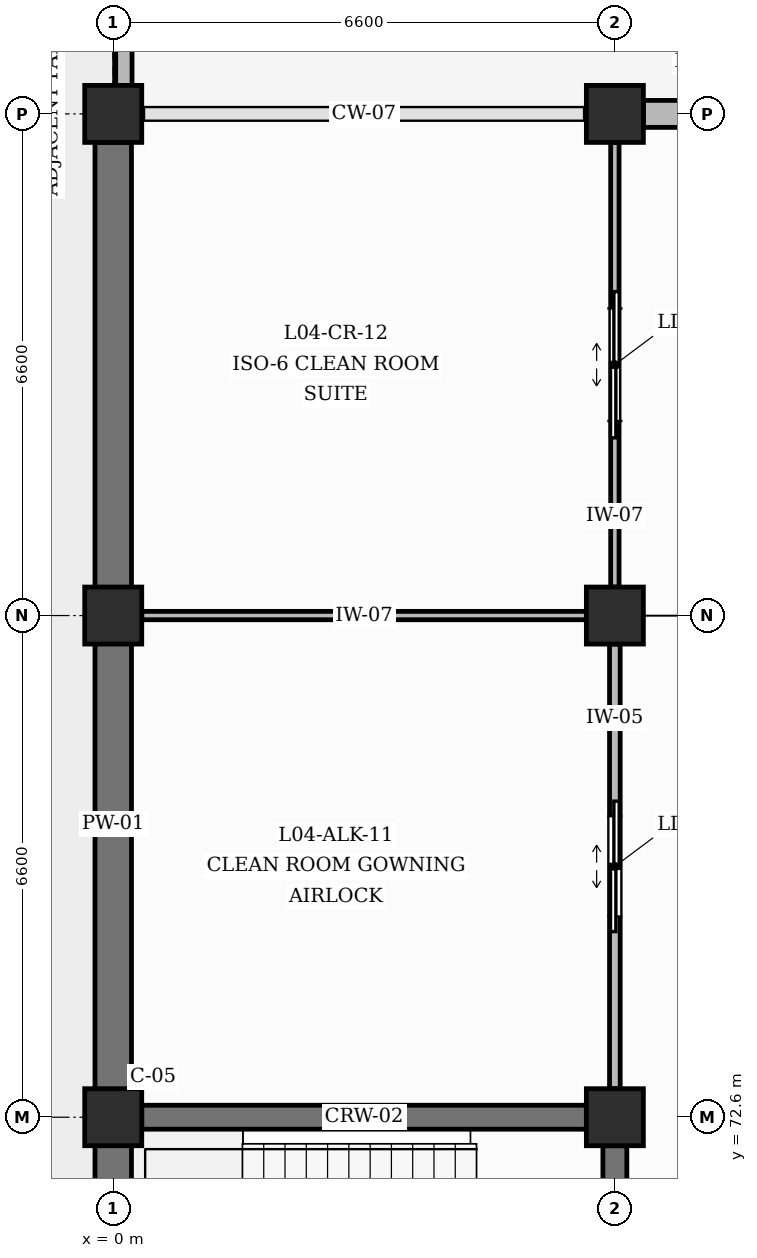
"""IFC4 building model, lengths in metres.
Left out: names, types, materials, properties, quantities, classifications, styles, units other than length and angle.
Written with IfcOpenShell. Run it as: python <this file> out.ifc"""

import sys

from ifc_helpers import new_model, si_unit, direction, frame, frame_2d, origin, origin_2d, place, context, subcontext, project, spatial, rectangle, extrude, element, fill, save


model = new_model("IFC4")
c1 = context("Model", 3, precision=1e-05, world=origin(), true_north=direction((0.0, 1.0)))
c2 = subcontext(c1, "Body", "Model", "MODEL_VIEW")
j1 = project(units=[si_unit("LENGTHUNIT", "METRE"), si_unit("PLANEANGLEUNIT", "RADIAN")], contexts=[c1])
p1 = place(None, origin())
s1 = spatial("IfcSite", under=j1, at=p1, CompositionType="ELEMENT")
p2 = place(p1, origin())
s2 = spatial("IfcBuilding", under=s1, at=p2, CompositionType="ELEMENT")
p3 = place(p2, frame((0.0, 0.0, 18.6)))
s3 = spatial("IfcBuildingStorey", under=s2, at=p3, CompositionType="ELEMENT", Elevation=18.6)
for number, where, z_axis, x_axis in (
    (1, (0.0, 72.6, 0.0), (0.0, 0.0, 1.0), (1.0, 0.0, 0.0)),
    (2, (0.0, 79.2, 0.0), (0.0, 0.0, 1.0), (1.0, 0.0, 0.0)),
    (3, (0.0, 85.8, 0.0), (0.0, 0.0, 1.0), (1.0, 0.0, 0.0)),
    (4, (6.6, 72.6, 0.0), (0.0, 0.0, 1.0), (1.0, 0.0, 0.0)),
    (5, (6.6, 79.2, 0.0), (0.0, 0.0, 1.0), (1.0, 0.0, 0.0)),
    (6, (6.6, 85.8, 0.0), (0.0, 0.0, 1.0), (1.0, 0.0, 0.0)),
):
    element("IfcColumn", number, at=place(p3, frame(where, z_axis=z_axis, x_axis=x_axis)), inside=s3, PredefinedType="COLUMN", context=c2, shape_type="SweptSolid", body=[
        extrude(rectangle(XDim=0.75, YDim=0.75, at=origin_2d()), origin(), (0.0, 0.0, 1.0), 4.2),
    ])
p4 = place(p3, frame((0.0, 66.375, 0.0), z_axis=(0.0, 0.0, 1.0), x_axis=(0.0, 1.0, 0.0)))
e7 = element("IfcWall", 7, at=p4, inside=s3, PredefinedType="SOLIDWALL", context=c2, shape_type="SweptSolid", body=[
    extrude(rectangle(XDim=5.85, YDim=0.48, at=frame_2d((2.925, 0.0))), origin(), (0.0, 0.0, 1.0), 3.26),
])
p5 = place(p3, frame((0.0, 72.975, 0.0), z_axis=(0.0, 0.0, 1.0), x_axis=(0.0, 1.0, 0.0)))
e8 = element("IfcWall", 8, at=p5, inside=s3, PredefinedType="SOLIDWALL", context=c2, shape_type="SweptSolid", body=[
    extrude(rectangle(XDim=5.85, YDim=0.48, at=frame_2d((2.925, 0.0))), origin(), (0.0, 0.0, 1.0), 3.26),
])
p6 = place(p3, frame((0.0, 79.575, 0.0), z_axis=(0.0, 0.0, 1.0), x_axis=(0.0, 1.0, 0.0)))
e9 = element("IfcWall", 9, at=p6, inside=s3, PredefinedType="SOLIDWALL", context=c2, shape_type="SweptSolid", body=[
    extrude(rectangle(XDim=5.85, YDim=0.48, at=frame_2d((2.925, 0.0))), origin(), (0.0, 0.0, 1.0), 3.26),
])
p7 = place(p3, frame((6.975, 85.8, 0.0), z_axis=(0.0, 0.0, 1.0), x_axis=(1.0, 0.0, 0.0)))
e10 = element("IfcWall", 10, at=p7, inside=s3, PredefinedType="SOLIDWALL", context=c2, shape_type="SweptSolid", body=[
    extrude(rectangle(XDim=5.85, YDim=0.355, at=frame_2d((2.925, 0.0))), origin(), (0.0, 0.0, 1.0), 3.26),
])
p8 = place(p7, frame((0.8, 0.0, 0.95)))
e11 = element("IfcOpeningElement", 11, at=p8, cuts=e10, PredefinedType="OPENING", context=c2, shape_type="SweptSolid", body=[
    extrude(rectangle(XDim=1.02, YDim=1.3, at=frame_2d((0.51, 0.65))), frame((0.0, 0.188, 0.0), z_axis=(0.0, -1.0, 0.0), x_axis=(1.0, 0.0, 0.0)), (0.0, 0.0, 1.0), 0.375),
])
p9 = place(p7, frame((4.03, 0.0, 0.95)))
e12 = element("IfcOpeningElement", 12, at=p9, cuts=e10, PredefinedType="OPENING", context=c2, shape_type="SweptSolid", body=[
    extrude(rectangle(XDim=1.02, YDim=1.3, at=frame_2d((0.51, 0.65))), frame((0.0, 0.188, 0.0), z_axis=(0.0, -1.0, 0.0), x_axis=(1.0, 0.0, 0.0)), (0.0, 0.0, 1.0), 0.375),
])
p10 = place(p3, frame((0.14, 86.1, 0.0), z_axis=(0.0, 0.0, 1.0), x_axis=(0.0, 1.0, 0.0)))
e13 = element("IfcWall", 13, at=p10, inside=s3, PredefinedType="PARAPET", context=c2, shape_type="SweptSolid", body=[
    extrude(rectangle(XDim=6.0, YDim=0.215, at=frame_2d((3.0, 0.0))), origin(), (0.0, 0.0, 1.0), 1.15),
])
p11 = place(p3, frame((0.375, 72.6, 0.0), z_axis=(0.0, 0.0, 1.0), x_axis=(1.0, 0.0, 0.0)))
e14 = element("IfcWall", 14, at=p11, inside=s3, PredefinedType="SHEAR", context=c2, shape_type="SweptSolid", body=[
    extrude(rectangle(XDim=5.85, YDim=0.315, at=frame_2d((2.925, 0.0))), origin(), (0.0, 0.0, 1.0), 3.16),
])
p12 = place(p3, frame((6.6, 66.375, 0.0), z_axis=(0.0, 0.0, 1.0), x_axis=(0.0, 1.0, 0.0)))
e15 = element("IfcWall", 15, at=p12, inside=s3, PredefinedType="SHEAR", context=c2, shape_type="SweptSolid", body=[
    extrude(rectangle(XDim=5.85, YDim=0.315, at=frame_2d((2.925, 0.0))), origin(), (0.0, 0.0, 1.0), 3.16),
])
p13 = place(p12, frame((2.35, 0.0, 0.0)))
e16 = element("IfcOpeningElement", 16, at=p13, cuts=e15, PredefinedType="OPENING", context=c2, shape_type="SweptSolid", body=[
    extrude(rectangle(XDim=1.15, YDim=2.2, at=frame_2d((0.575, 1.1))), frame((0.0, 0.167, 0.0), z_axis=(0.0, -1.0, 0.0), x_axis=(1.0, 0.0, 0.0)), (0.0, 0.0, 1.0), 0.335),
])
p14 = place(p3, frame((6.6, 72.975, 0.0), z_axis=(0.0, 0.0, 1.0), x_axis=(0.0, 1.0, 0.0)))
e17 = element("IfcWall", 17, at=p14, inside=s3, PredefinedType="PARTITIONING", context=c2, shape_type="SweptSolid", body=[
    extrude(rectangle(XDim=5.85, YDim=0.14, at=frame_2d((2.925, 0.0))), origin(), (0.0, 0.0, 1.0), 3.16),
])
p15 = place(p14, frame((2.265, 0.0, 0.0)))
e18 = element("IfcOpeningElement", 18, at=p15, cuts=e17, PredefinedType="OPENING", context=c2, shape_type="SweptSolid", body=[
    extrude(rectangle(XDim=1.32, YDim=2.2, at=frame_2d((0.66, 1.1))), frame((0.0, 0.08, 0.0), z_axis=(0.0, -1.0, 0.0), x_axis=(1.0, 0.0, 0.0)), (0.0, 0.0, 1.0), 0.16),
])
p16 = place(p3, frame((0.375, 79.2, 0.0), z_axis=(0.0, 0.0, 1.0), x_axis=(1.0, 0.0, 0.0)))
e19 = element("IfcWall", 19, at=p16, inside=s3, PredefinedType="PARTITIONING", context=c2, shape_type="SweptSolid", body=[
    extrude(rectangle(XDim=5.85, YDim=0.11, at=frame_2d((2.925, 0.0))), origin(), (0.0, 0.0, 1.0), 3.16),
])
p17 = place(p3, frame((6.6, 79.575, 0.0), z_axis=(0.0, 0.0, 1.0), x_axis=(0.0, 1.0, 0.0)))
e20 = element("IfcWall", 20, at=p17, inside=s3, PredefinedType="PARTITIONING", context=c2, shape_type="SweptSolid", body=[
    extrude(rectangle(XDim=5.85, YDim=0.11, at=frame_2d((2.925, 0.0))), origin(), (0.0, 0.0, 1.0), 3.16),
])
p18 = place(p17, frame((2.185, 0.0, 0.0)))
e21 = element("IfcOpeningElement", 21, at=p18, cuts=e20, PredefinedType="OPENING", context=c2, shape_type="SweptSolid", body=[
    extrude(rectangle(XDim=1.48, YDim=2.25, at=frame_2d((0.74, 1.125))), frame((0.0, 0.065, 0.0), z_axis=(0.0, -1.0, 0.0), x_axis=(1.0, 0.0, 0.0)), (0.0, 0.0, 1.0), 0.13),
])
p19 = place(p15, origin())
e22 = element("IfcDoor", 22, at=p19, inside=s3, OperationType="DOUBLE_DOOR_SLIDING", PredefinedType="USERDEFINED", context=c2, shape_type="SweptSolid", body=[
    extrude(rectangle(XDim=1.32, YDim=2.2, at=frame_2d((0.66, 1.1))), frame((0.0, 0.025, 0.0), z_axis=(0.0, -1.0, 0.0), x_axis=(1.0, 0.0, 0.0)), (0.0, 0.0, 1.0), 0.05),
])
fill(e18, e22)
p20 = place(p18, origin())
e23 = element("IfcDoor", 23, at=p20, inside=s3, OperationType="DOUBLE_DOOR_SLIDING", PredefinedType="USERDEFINED", context=c2, shape_type="SweptSolid", body=[
    extrude(rectangle(XDim=1.48, YDim=2.25, at=frame_2d((0.74, 1.125))), frame((0.0, 0.025, 0.0), z_axis=(0.0, -1.0, 0.0), x_axis=(1.0, 0.0, 0.0)), (0.0, 0.0, 1.0), 0.05),
])
fill(e21, e23)
save(model, sys.argv[1])
